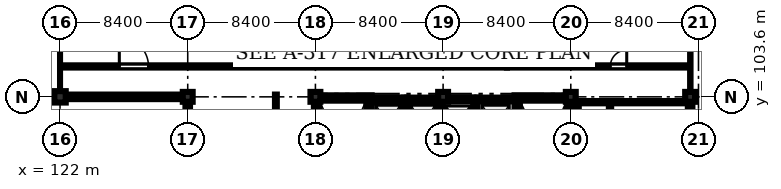
"""IFC4 building model, lengths in metres.
Left out: names, types, materials, properties, quantities, classifications, styles, units other than length and angle.
Written with IfcOpenShell. Run it as: python <this file> out.ifc"""

import sys

from ifc_helpers import new_model, si_unit, direction, frame, frame_2d, origin, origin_2d, place, context, subcontext, project, spatial, rectangle, extrude, element, fill, save


model = new_model("IFC4")
c1 = context("Model", 3, precision=1e-05, world=origin(), true_north=direction((0.0, 1.0)))
c2 = subcontext(c1, "Body", "Model", "MODEL_VIEW")
j1 = project(units=[si_unit("LENGTHUNIT", "METRE"), si_unit("PLANEANGLEUNIT", "RADIAN")], contexts=[c1])
p1 = place(None, origin())
s1 = spatial("IfcSite", under=j1, at=p1, CompositionType="ELEMENT")
p2 = place(p1, origin())
s2 = spatial("IfcBuilding", under=s1, at=p2, CompositionType="ELEMENT")
p3 = place(p2, frame((0.0, 0.0, 61.2)))
s3 = spatial("IfcBuildingStorey", under=s2, at=p3, CompositionType="ELEMENT", Elevation=61.2)
p4 = place(p3, frame((122.0, 103.6, 0.0), z_axis=(0.0, 0.0, 1.0), x_axis=(1.0, 0.0, 0.0)))
e1 = element("IfcColumn", 1, at=p4, inside=s3, PredefinedType="COLUMN", context=c2, shape_type="SweptSolid", body=[
    extrude(rectangle(XDim=0.75, YDim=0.75, at=origin_2d()), origin(), (0.0, 0.0, 1.0), 4.28),
])
for number, where, z_axis, x_axis in (
    (2, (130.4, 103.6, 0.0), (0.0, 0.0, 1.0), (1.0, 0.0, 0.0)),
    (3, (138.8, 103.6, 0.0), (0.0, 0.0, 1.0), (1.0, 0.0, 0.0)),
    (4, (147.2, 103.6, 0.0), (0.0, 0.0, 1.0), (1.0, 0.0, 0.0)),
    (5, (155.6, 103.6, 0.0), (0.0, 0.0, 1.0), (1.0, 0.0, 0.0)),
    (6, (163.45, 103.6, 0.0), (0.0, 0.0, 1.0), (1.0, 0.0, 0.0)),
):
    element("IfcColumn", number, at=place(p3, frame(where, z_axis=z_axis, x_axis=x_axis)), inside=s3, PredefinedType="COLUMN", context=c2, shape_type="SweptSolid", body=[
        extrude(rectangle(XDim=0.65, YDim=0.65, at=origin_2d()), origin(), (0.0, 0.0, 1.0), 4.28),
    ])
p5 = place(p3, frame((138.7, 103.525, 0.0), z_axis=(0.0, 0.0, 1.0), x_axis=(1.0, 0.0, 0.0)))
e7 = element("IfcWall", 7, at=p5, inside=s3, PredefinedType="SHEAR", context=c2, shape_type="SweptSolid", body=[
    extrude(rectangle(XDim=3.8, YDim=0.35, at=frame_2d((1.9, 0.0))), origin(), (0.0, 0.0, 1.0), 4.28),
])
p6 = place(p3, frame((138.875, 95.45, 0.0), z_axis=(0.0, 0.0, 1.0), x_axis=(0.0, 1.0, 0.0)))
e8 = element("IfcWall", 8, at=p6, inside=s3, PredefinedType="SHEAR", context=c2, shape_type="SweptSolid", body=[
    extrude(rectangle(XDim=7.9, YDim=0.35, at=frame_2d((3.95, 0.0))), origin(), (0.0, 0.0, 1.0), 4.28),
])
p7 = place(p3, frame((142.325, 95.45, 0.0), z_axis=(0.0, 0.0, 1.0), x_axis=(0.0, 1.0, 0.0)))
e9 = element("IfcWall", 9, at=p7, inside=s3, PredefinedType="SHEAR", context=c2, shape_type="SweptSolid", body=[
    extrude(rectangle(XDim=7.9, YDim=0.35, at=frame_2d((3.95, 0.0))), origin(), (0.0, 0.0, 1.0), 4.28),
])
p8 = place(p7, frame((0.22, 0.0, 0.0)))
e10 = element("IfcOpeningElement", 10, at=p8, cuts=e9, PredefinedType="OPENING", context=c2, shape_type="SweptSolid", body=[
    extrude(rectangle(XDim=1.15, YDim=2.15, at=frame_2d((0.575, 1.075))), frame((0.0, 0.185, 0.0), z_axis=(0.0, -1.0, 0.0), x_axis=(1.0, 0.0, 0.0)), (0.0, 0.0, 1.0), 0.37),
])
p9 = place(p3, frame((151.9, 103.525, 0.0), z_axis=(0.0, 0.0, 1.0), x_axis=(1.0, 0.0, 0.0)))
e11 = element("IfcWall", 11, at=p9, inside=s3, PredefinedType="SHEAR", context=c2, shape_type="SweptSolid", body=[
    extrude(rectangle(XDim=3.8, YDim=0.35, at=frame_2d((1.9, 0.0))), origin(), (0.0, 0.0, 1.0), 4.28),
])
p10 = place(p3, frame((152.075, 95.45, 0.0), z_axis=(0.0, 0.0, 1.0), x_axis=(0.0, 1.0, 0.0)))
e12 = element("IfcWall", 12, at=p10, inside=s3, PredefinedType="SHEAR", context=c2, shape_type="SweptSolid", body=[
    extrude(rectangle(XDim=7.9, YDim=0.35, at=frame_2d((3.95, 0.0))), origin(), (0.0, 0.0, 1.0), 4.28),
])
p11 = place(p10, frame((0.35, 0.0, 0.0)))
e13 = element("IfcOpeningElement", 13, at=p11, cuts=e12, PredefinedType="OPENING", context=c2, shape_type="SweptSolid", body=[
    extrude(rectangle(XDim=1.15, YDim=2.15, at=frame_2d((0.575, 1.075))), frame((0.0, 0.185, 0.0), z_axis=(0.0, -1.0, 0.0), x_axis=(1.0, 0.0, 0.0)), (0.0, 0.0, 1.0), 0.37),
])
p12 = place(p3, frame((155.525, 95.45, 0.0), z_axis=(0.0, 0.0, 1.0), x_axis=(0.0, 1.0, 0.0)))
e14 = element("IfcWall", 14, at=p12, inside=s3, PredefinedType="SHEAR", context=c2, shape_type="SweptSolid", body=[
    extrude(rectangle(XDim=7.9, YDim=0.35, at=frame_2d((3.95, 0.0))), origin(), (0.0, 0.0, 1.0), 4.28),
])
p13 = place(p3, frame((142.5, 103.425, 0.0), z_axis=(0.0, 0.0, 1.0), x_axis=(1.0, 0.0, 0.0)))
e15 = element("IfcWall", 15, at=p13, inside=s3, PredefinedType="SHEAR", context=c2, shape_type="SweptSolid", body=[
    extrude(rectangle(XDim=2.1, YDim=0.25, at=frame_2d((1.05, 0.0))), origin(), (0.0, 0.0, 1.0), 4.28),
])
p14 = place(p3, frame((144.725, 100.15, 0.0), z_axis=(0.0, 0.0, 1.0), x_axis=(0.0, 1.0, 0.0)))
e16 = element("IfcWall", 16, at=p14, inside=s3, PredefinedType="SHEAR", context=c2, shape_type="SweptSolid", body=[
    extrude(rectangle(XDim=3.4, YDim=0.25, at=frame_2d((1.7, 0.0))), origin(), (0.0, 0.0, 1.0), 4.28),
])
p15 = place(p3, frame((144.85, 103.425, 0.0), z_axis=(0.0, 0.0, 1.0), x_axis=(1.0, 0.0, 0.0)))
e17 = element("IfcWall", 17, at=p15, inside=s3, PredefinedType="SHEAR", context=c2, shape_type="SweptSolid", body=[
    extrude(rectangle(XDim=2.05, YDim=0.25, at=frame_2d((1.025, 0.0))), origin(), (0.0, 0.0, 1.0), 4.28),
])
p16 = place(p3, frame((147.025, 100.15, 0.0), z_axis=(0.0, 0.0, 1.0), x_axis=(0.0, 1.0, 0.0)))
e18 = element("IfcWall", 18, at=p16, inside=s3, PredefinedType="SHEAR", context=c2, shape_type="SweptSolid", body=[
    extrude(rectangle(XDim=3.4, YDim=0.25, at=frame_2d((1.7, 0.0))), origin(), (0.0, 0.0, 1.0), 4.28),
])
p17 = place(p3, frame((147.15, 103.425, 0.0), z_axis=(0.0, 0.0, 1.0), x_axis=(1.0, 0.0, 0.0)))
e19 = element("IfcWall", 19, at=p17, inside=s3, PredefinedType="SHEAR", context=c2, shape_type="SweptSolid", body=[
    extrude(rectangle(XDim=2.05, YDim=0.25, at=frame_2d((1.025, 0.0))), origin(), (0.0, 0.0, 1.0), 4.28),
])
p18 = place(p3, frame((149.325, 100.35, 0.0), z_axis=(0.0, 0.0, 1.0), x_axis=(0.0, 1.0, 0.0)))
e20 = element("IfcWall", 20, at=p18, inside=s3, PredefinedType="SHEAR", context=c2, shape_type="SweptSolid", body=[
    extrude(rectangle(XDim=3.2, YDim=0.25, at=frame_2d((1.6, 0.0))), origin(), (0.0, 0.0, 1.0), 4.28),
])
p19 = place(p3, frame((149.45, 103.425, 0.0), z_axis=(0.0, 0.0, 1.0), x_axis=(1.0, 0.0, 0.0)))
e21 = element("IfcWall", 21, at=p19, inside=s3, PredefinedType="SHEAR", context=c2, shape_type="SweptSolid", body=[
    extrude(rectangle(XDim=2.45, YDim=0.25, at=frame_2d((1.225, 0.0))), origin(), (0.0, 0.0, 1.0), 4.28),
])
p20 = place(p3, frame((163.45, 103.275, 0.0), z_axis=(0.0, 0.0, 1.0), x_axis=(0.0, -1.0, 0.0)))
e22 = element("IfcWall", 22, at=p20, inside=s3, PredefinedType="STANDARD", context=c2, shape_type="SweptSolid", body=[
    extrude(rectangle(XDim=7.75, YDim=0.3, at=frame_2d((3.875, 0.0))), origin(), (0.0, 0.0, 1.0), 3.58),
])
p21 = place(p20, frame((1.15, 0.0, 1.1)))
e23 = element("IfcOpeningElement", 23, at=p21, cuts=e22, PredefinedType="OPENING", context=c2, shape_type="SweptSolid", body=[
    extrude(rectangle(XDim=1.4, YDim=1.4, at=frame_2d((0.7, 0.7))), frame((0.0, 0.16, 0.0), z_axis=(0.0, -1.0, 0.0), x_axis=(1.0, 0.0, 0.0)), (0.0, 0.0, 1.0), 0.32),
])
p22 = place(p3, frame((130.4, 95.525, 0.0), z_axis=(0.0, 0.0, 1.0), x_axis=(0.0, 1.0, 0.0)))
e24 = element("IfcWall", 24, at=p22, inside=s3, PredefinedType="STANDARD", context=c2, shape_type="SweptSolid", body=[
    extrude(rectangle(XDim=7.75, YDim=0.3, at=frame_2d((3.875, 0.0))), origin(), (0.0, 0.0, 1.0), 3.58),
])
p23 = place(p22, frame((2.4, 0.0, 1.0)))
e25 = element("IfcOpeningElement", 25, at=p23, cuts=e24, PredefinedType="OPENING", context=c2, shape_type="SweptSolid", body=[
    extrude(rectangle(XDim=1.8, YDim=1.8, at=frame_2d((0.9, 0.9))), frame((0.0, 0.16, 0.0), z_axis=(0.0, -1.0, 0.0), x_axis=(1.0, 0.0, 0.0)), (0.0, 0.0, 1.0), 0.32),
])
p24 = place(p3, frame((130.075, 103.6, 0.0), z_axis=(0.0, 0.0, 1.0), x_axis=(-1.0, 0.0, 0.0)))
e26 = element("IfcWall", 26, at=p24, inside=s3, PredefinedType="STANDARD", context=c2, shape_type="SweptSolid", body=[
    extrude(rectangle(XDim=7.7, YDim=0.3, at=frame_2d((3.85, 0.0))), origin(), (0.0, 0.0, 1.0), 3.58),
])
p25 = place(p3, frame((158.18, 94.68, 0.0), z_axis=(0.0, 0.0, 1.0), x_axis=(0.0, 1.0, 0.0)))
e27 = element("IfcWall", 27, at=p25, inside=s3, PredefinedType="PARTITIONING", context=c2, shape_type="SweptSolid", body=[
    extrude(rectangle(XDim=8.57, YDim=0.15, at=frame_2d((4.285, 0.0))), origin(), (0.0, 0.0, 1.0), 4.28),
])
p26 = place(p25, frame((0.8, 0.0, 0.0)))
e28 = element("IfcOpeningElement", 28, at=p26, cuts=e27, PredefinedType="OPENING", context=c2, shape_type="SweptSolid", body=[
    extrude(rectangle(XDim=1.0, YDim=2.12, at=frame_2d((0.5, 1.06))), frame((0.0, 0.085, 0.0), z_axis=(0.0, -1.0, 0.0), x_axis=(1.0, 0.0, 0.0)), (0.0, 0.0, 1.0), 0.17),
])
p27 = place(p25, frame((3.5, 0.0, 0.0)))
e29 = element("IfcOpeningElement", 29, at=p27, cuts=e27, PredefinedType="OPENING", context=c2, shape_type="SweptSolid", body=[
    extrude(rectangle(XDim=0.92, YDim=2.1, at=frame_2d((0.46, 1.05))), frame((0.0, 0.085, 0.0), z_axis=(0.0, -1.0, 0.0), x_axis=(1.0, 0.0, 0.0)), (0.0, 0.0, 1.0), 0.17),
])
p28 = place(p25, frame((6.4, 0.0, 0.0)))
e30 = element("IfcOpeningElement", 30, at=p28, cuts=e27, PredefinedType="OPENING", context=c2, shape_type="SweptSolid", body=[
    extrude(rectangle(XDim=0.92, YDim=2.1, at=frame_2d((0.46, 1.05))), frame((0.0, 0.085, 0.0), z_axis=(0.0, -1.0, 0.0), x_axis=(1.0, 0.0, 0.0)), (0.0, 0.0, 1.0), 0.17),
])
p29 = place(p3, frame((156.05, 103.25, 0.0), z_axis=(0.0, 0.0, 1.0), x_axis=(1.0, 0.0, 0.0)))
e31 = element("IfcWall", 31, at=p29, inside=s3, PredefinedType="PARTITIONING", context=c2, shape_type="SweptSolid", body=[
    extrude(rectangle(XDim=7.15, YDim=0.15, at=frame_2d((3.575, 0.0))), origin(), (0.0, 0.0, 1.0), 4.28),
])
p30 = place(p3, frame((156.05, 94.68, 0.0), z_axis=(0.0, 0.0, 1.0), x_axis=(0.0, 1.0, 0.0)))
e32 = element("IfcWall", 32, at=p30, inside=s3, PredefinedType="PARTITIONING", context=c2, shape_type="SweptSolid", body=[
    extrude(rectangle(XDim=8.57, YDim=0.15, at=frame_2d((4.285, 0.0))), origin(), (0.0, 0.0, 1.0), 4.28),
])
p31 = place(p3, frame((136.2, 94.68, 0.0), z_axis=(0.0, 0.0, 1.0), x_axis=(0.0, 1.0, 0.0)))
e33 = element("IfcWall", 33, at=p31, inside=s3, PredefinedType="PARTITIONING", context=c2, shape_type="SweptSolid", body=[
    extrude(rectangle(XDim=9.07, YDim=0.12, at=frame_2d((4.535, 0.0))), origin(), (0.0, 0.0, 1.0), 4.28),
])
p32 = place(p3, frame((122.15, 105.6, 0.0), z_axis=(0.0, 0.0, 1.0), x_axis=(1.0, 0.0, 0.0)))
e34 = element("IfcWall", 34, at=p32, inside=s3, PredefinedType="PARTITIONING", context=c2, shape_type="SweptSolid", body=[
    extrude(rectangle(XDim=29.25, YDim=0.145, at=frame_2d((14.625, 0.0))), origin(), (0.0, 0.0, 1.0), 4.28),
])
p33 = place(p32, frame((3.75, 0.0, 0.0)))
e35 = element("IfcOpeningElement", 35, at=p33, cuts=e34, PredefinedType="OPENING", context=c2, shape_type="SweptSolid", body=[
    extrude(rectangle(XDim=1.92, YDim=2.28, at=frame_2d((0.96, 1.14))), frame((0.0, 0.083, 0.0), z_axis=(0.0, -1.0, 0.0), x_axis=(1.0, 0.0, 0.0)), (0.0, 0.0, 1.0), 0.165),
])
p34 = place(p3, frame((151.4, 105.6, 0.0), z_axis=(0.0, 0.0, 1.0), x_axis=(1.0, 0.0, 0.0)))
e36 = element("IfcWall", 36, at=p34, inside=s3, PredefinedType="PARTITIONING", context=c2, shape_type="SweptSolid", body=[
    extrude(rectangle(XDim=11.95, YDim=0.145, at=frame_2d((5.975, 0.0))), origin(), (0.0, 0.0, 1.0), 4.28),
])
p35 = place(p34, frame((6.8, 0.0, 0.0)))
e37 = element("IfcOpeningElement", 37, at=p35, cuts=e36, PredefinedType="OPENING", context=c2, shape_type="SweptSolid", body=[
    extrude(rectangle(XDim=1.08, YDim=2.15, at=frame_2d((0.54, 1.075))), frame((0.0, 0.083, 0.0), z_axis=(0.0, -1.0, 0.0), x_axis=(1.0, 0.0, 0.0)), (0.0, 0.0, 1.0), 0.165),
])
p36 = place(p3, frame((151.4, 105.6, 0.0), z_axis=(0.0, 0.0, 1.0), x_axis=(0.0, 1.0, 0.0)))
e38 = element("IfcWall", 38, at=p36, inside=s3, PredefinedType="PARTITIONING", context=c2, shape_type="SweptSolid", body=[
    extrude(rectangle(XDim=5.75, YDim=0.135, at=frame_2d((2.875, 0.0))), origin(), (0.0, 0.0, 1.0), 3.83),
])
p37 = place(p33, origin())
e39 = element("IfcDoor", 39, at=p37, inside=s3, OperationType="SINGLE_SWING_LEFT", PredefinedType="DOOR", context=c2, shape_type="SweptSolid", body=[
    extrude(rectangle(XDim=1.92, YDim=2.28, at=frame_2d((0.96, 1.14))), frame((0.0, 0.025, 0.0), z_axis=(0.0, -1.0, 0.0), x_axis=(1.0, 0.0, 0.0)), (0.0, 0.0, 1.0), 0.05),
])
fill(e35, e39)
p38 = place(p35, origin())
e40 = element("IfcDoor", 40, at=p38, inside=s3, OperationType="SINGLE_SWING_RIGHT", PredefinedType="DOOR", context=c2, shape_type="SweptSolid", body=[
    extrude(rectangle(XDim=1.08, YDim=2.15, at=frame_2d((0.54, 1.075))), frame((0.0, 0.025, 0.0), z_axis=(0.0, -1.0, 0.0), x_axis=(1.0, 0.0, 0.0)), (0.0, 0.0, 1.0), 0.05),
])
fill(e37, e40)
save(model, sys.argv[1])
